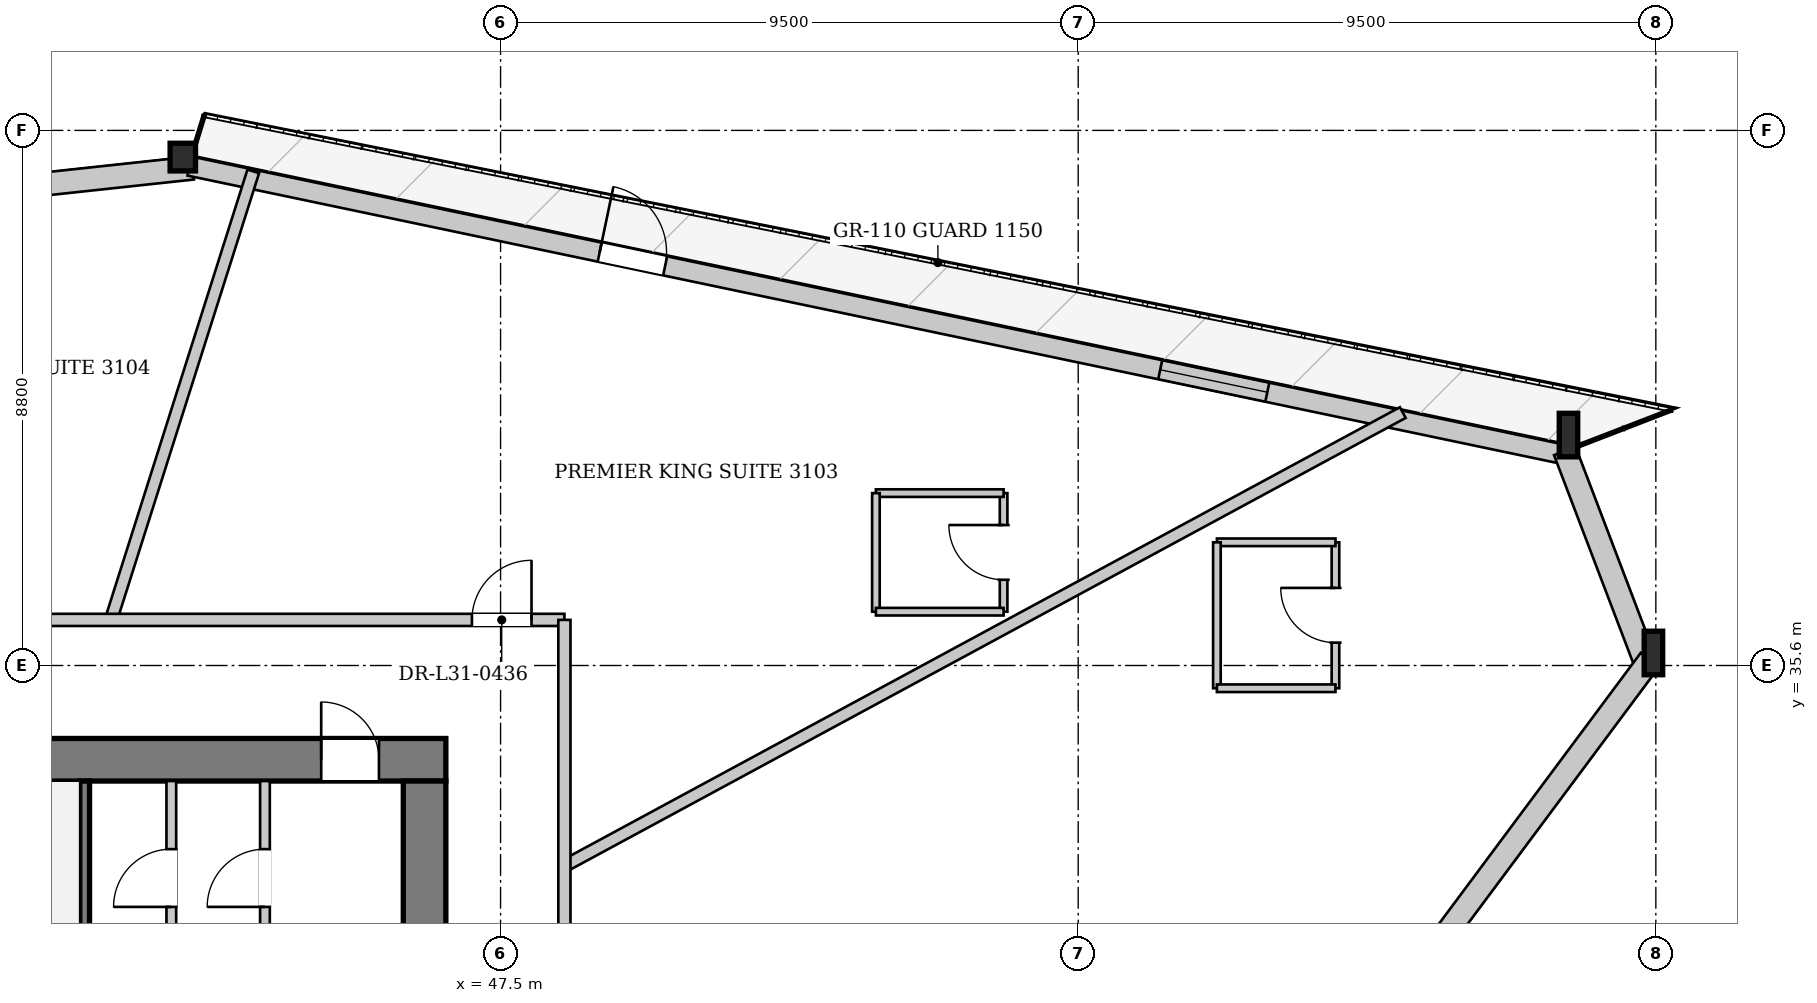
"""IFC4 building model, lengths in metres.
Left out: names, types, materials, properties, quantities, classifications, styles, units other than length and angle.
Written with IfcOpenShell. Run it as: python <this file> out.ifc"""

import sys

from ifc_helpers import new_model, si_unit, direction, frame, frame_2d, origin, origin_2d, place, context, subcontext, project, spatial, rectangle, i_section, extrude, source, transform, mapped, element, fill, save


model = new_model("IFC4")
c1 = context("Model", 3, precision=1e-05, world=origin(), true_north=direction((0.0, 1.0)))
c2 = subcontext(c1, "Body", "Model", "MODEL_VIEW")
j1 = project(units=[si_unit("LENGTHUNIT", "METRE"), si_unit("PLANEANGLEUNIT", "RADIAN")], contexts=[c1])
p1 = place(None, origin())
s1 = spatial("IfcSite", under=j1, at=p1, CompositionType="ELEMENT")
p2 = place(p1, origin())
s2 = spatial("IfcBuilding", under=s1, at=p2, CompositionType="ELEMENT")
p3 = place(p2, frame((0.0, 0.0, 119.9)))
s3 = spatial("IfcBuildingStorey", under=s2, at=p3, CompositionType="ELEMENT", Elevation=119.9)
m1 = source(origin(), c2, "Body", "SweptSolid", [
    extrude(i_section(OverallWidth=0.304, OverallDepth=0.716, WebThickness=0.021, FlangeThickness=0.04, at=origin_2d()), origin(), (0.0, 0.0, 1.0), 3.42),
])
p4 = place(p3, frame((66.557, 35.582, 0.0), z_axis=(-0.05632334247, 0.131135589503, 0.989763172814), x_axis=(-0.918834286781, -0.394643577719, 0.0)))
e1 = element("IfcColumn", 1, at=p4, inside=s3, PredefinedType="COLUMN", context=c2, shape_type="MappedRepresentation", body=[
    mapped(m1, transform((0.0, 0.0, 0.0), x_axis=(1.0, 0.0, 0.0), y_axis=(0.0, 1.0, 0.0), z_axis=(0.0, 0.0, 1.0), scale=1.0)),
])
m2 = source(origin(), c2, "Body", "SweptSolid", [
    extrude(i_section(OverallWidth=0.304, OverallDepth=0.716, WebThickness=0.021, FlangeThickness=0.04, at=origin_2d()), origin(), (0.0, 0.0, 1.0), 3.416),
])
p5 = place(p3, frame((65.181, 39.194, 0.0), z_axis=(-0.068833353091, 0.114436342989, 0.991043032822), x_axis=(-0.856925676529, -0.515439991566, 0.0)))
e2 = element("IfcColumn", 2, at=p5, inside=s3, PredefinedType="COLUMN", context=c2, shape_type="MappedRepresentation", body=[
    mapped(m2, transform((0.0, 0.0, 0.0), x_axis=(1.0, 0.0, 0.0), y_axis=(0.0, 1.0, 0.0), z_axis=(0.0, 0.0, 1.0), scale=1.0)),
])
m3 = source(origin(), c2, "Body", "SweptSolid", [
    extrude(i_section(OverallWidth=0.418, OverallDepth=0.455, WebThickness=0.038, FlangeThickness=0.059, at=origin_2d()), origin(), (0.0, 0.0, 1.0), 3.397),
])
p6 = place(p3, frame((42.417, 43.97, 0.0), z_axis=(-0.08401367615, -0.00546196697, 0.996449632012), x_axis=(0.064875871655, -0.997893341634, 0.0)))
e3 = element("IfcColumn", 3, at=p6, inside=s3, PredefinedType="COLUMN", context=c2, shape_type="MappedRepresentation", body=[
    mapped(m3, transform((0.0, 0.0, 0.0), x_axis=(1.0, 0.0, 0.0), y_axis=(0.0, 1.0, 0.0), z_axis=(0.0, 0.0, 1.0), scale=1.0)),
])
p7 = place(p3, frame((19.312, 41.287, 0.0), z_axis=(0.0, 0.0, 1.0), x_axis=(0.994233058372, 0.107240969969, 0.0)))
e4 = element("IfcWall", 4, at=p7, inside=s3, PredefinedType="SOLIDWALL", context=c2, shape_type="SweptSolid", body=[
    extrude(rectangle(XDim=23.26, YDim=0.38, at=frame_2d((11.63, 0.0))), origin(), (0.0, 0.0, 1.0), 2.692),
])
p8 = place(p7, frame((5.413, 0.0, 0.322)))
e5 = element("IfcOpeningElement", 5, at=p8, cuts=e4, PredefinedType="OPENING", context=c2, shape_type="SweptSolid", body=[
    extrude(rectangle(XDim=2.2, YDim=2.25, at=frame_2d((1.1, 1.125))), frame((0.0, 0.2, 0.0), z_axis=(0.0, -1.0, 0.0), x_axis=(1.0, 0.0, 0.0)), (0.0, 0.0, 1.0), 0.4),
])
p9 = place(p7, frame((15.647, 0.0, 0.322)))
e6 = element("IfcOpeningElement", 6, at=p9, cuts=e4, PredefinedType="OPENING", context=c2, shape_type="SweptSolid", body=[
    extrude(rectangle(XDim=2.2, YDim=2.25, at=frame_2d((1.1, 1.125))), frame((0.0, 0.2, 0.0), z_axis=(0.0, -1.0, 0.0), x_axis=(1.0, 0.0, 0.0)), (0.0, 0.0, 1.0), 0.4),
])
p10 = place(p3, frame((42.384, 43.813, 0.0), z_axis=(0.0, 0.0, 1.0), x_axis=(0.978690657653, -0.205340197291, 0.0)))
e7 = element("IfcWall", 7, at=p10, inside=s3, PredefinedType="SOLIDWALL", context=c2, shape_type="SweptSolid", body=[
    extrude(rectangle(XDim=23.26, YDim=0.32, at=frame_2d((11.63, 0.0))), origin(), (0.0, 0.0, 1.0), 2.692),
])
p11 = place(p10, frame((6.893, 0.0, 0.0)))
e8 = element("IfcOpeningElement", 8, at=p11, cuts=e7, PredefinedType="OPENING", context=c2, shape_type="SweptSolid", body=[
    extrude(rectangle(XDim=1.1, YDim=2.3, at=frame_2d((0.55, 1.15))), frame((0.0, 0.17, 0.0), z_axis=(0.0, -1.0, 0.0), x_axis=(1.0, 0.0, 0.0)), (0.0, 0.0, 1.0), 0.34),
])
p12 = place(p10, frame((16.312, 0.0, 0.372)))
e9 = element("IfcOpeningElement", 9, at=p12, cuts=e7, PredefinedType="OPENING", context=c2, shape_type="SweptSolid", body=[
    extrude(rectangle(XDim=1.8, YDim=2.2, at=frame_2d((0.9, 1.1))), frame((0.0, 0.17, 0.0), z_axis=(0.0, -1.0, 0.0), x_axis=(1.0, 0.0, 0.0)), (0.0, 0.0, 1.0), 0.34),
])
p13 = place(p3, frame((65.003, 39.126, 0.0), z_axis=(0.0, 0.0, 1.0), x_axis=(0.355929661072, -0.934512748104, 0.0)))
e10 = element("IfcWall", 10, at=p13, inside=s3, PredefinedType="SOLIDWALL", context=c2, shape_type="SweptSolid", body=[
    extrude(rectangle(XDim=3.865, YDim=0.38, at=frame_2d((1.933, 0.0))), origin(), (0.0, 0.0, 1.0), 2.692),
])
p14 = place(p3, frame((66.404, 35.695, 0.0), z_axis=(0.0, 0.0, 1.0), x_axis=(-0.59725858194, -0.802048743094, 0.0)))
e11 = element("IfcWall", 11, at=p14, inside=s3, PredefinedType="SOLIDWALL", context=c2, shape_type="SweptSolid", body=[
    extrude(rectangle(XDim=23.855, YDim=0.38, at=frame_2d((11.927, 0.0))), origin(), (0.0, 0.0, 1.0), 2.692),
])
p15 = place(p14, frame((5.579, 0.0, 0.322)))
e12 = element("IfcOpeningElement", 12, at=p15, cuts=e11, PredefinedType="OPENING", context=c2, shape_type="SweptSolid", body=[
    extrude(rectangle(XDim=2.2, YDim=2.25, at=frame_2d((1.1, 1.125))), frame((0.0, 0.2, 0.0), z_axis=(0.0, -1.0, 0.0), x_axis=(1.0, 0.0, 0.0)), (0.0, 0.0, 1.0), 0.4),
])
p16 = place(p14, frame((14.476, 0.0, 0.322)))
e13 = element("IfcOpeningElement", 13, at=p16, cuts=e11, PredefinedType="OPENING", context=c2, shape_type="SweptSolid", body=[
    extrude(rectangle(XDim=2.2, YDim=2.25, at=frame_2d((1.1, 1.125))), frame((0.0, 0.2, 0.0), z_axis=(0.0, -1.0, 0.0), x_axis=(1.0, 0.0, 0.0)), (0.0, 0.0, 1.0), 0.4),
])
p17 = place(p3, frame((29.4, 34.05, 0.0), z_axis=(0.0, 0.0, 1.0), x_axis=(1.0, 0.0, 0.0)))
e14 = element("IfcWall", 14, at=p17, inside=s3, PredefinedType="SHEAR", context=c2, shape_type="SweptSolid", body=[
    extrude(rectangle(XDim=17.2, YDim=0.7, at=frame_2d((8.6, 0.0))), origin(), (0.0, 0.0, 1.0), 3.3),
])
p18 = place(p17, frame((1.7, 0.0, 0.0)))
e15 = element("IfcOpeningElement", 15, at=p18, cuts=e14, PredefinedType="OPENING", context=c2, shape_type="SweptSolid", body=[
    extrude(rectangle(XDim=0.95, YDim=2.1, at=frame_2d((0.475, 1.05))), frame((0.0, 0.36, 0.0), z_axis=(0.0, -1.0, 0.0), x_axis=(1.0, 0.0, 0.0)), (0.0, 0.0, 1.0), 0.72),
])
p19 = place(p17, frame((4.08, 0.0, 0.0)))
e16 = element("IfcOpeningElement", 16, at=p19, cuts=e14, PredefinedType="OPENING", context=c2, shape_type="SweptSolid", body=[
    extrude(rectangle(XDim=1.32, YDim=2.2, at=frame_2d((0.66, 1.1))), frame((0.0, 0.36, 0.0), z_axis=(0.0, -1.0, 0.0), x_axis=(1.0, 0.0, 0.0)), (0.0, 0.0, 1.0), 0.72),
])
p20 = place(p17, frame((15.15, 0.0, 0.0)))
e17 = element("IfcOpeningElement", 17, at=p20, cuts=e14, PredefinedType="OPENING", context=c2, shape_type="SweptSolid", body=[
    extrude(rectangle(XDim=0.95, YDim=2.1, at=frame_2d((0.475, 1.05))), frame((0.0, 0.36, 0.0), z_axis=(0.0, -1.0, 0.0), x_axis=(1.0, 0.0, 0.0)), (0.0, 0.0, 1.0), 0.72),
])
p21 = place(p3, frame((46.25, 33.7, 0.0), z_axis=(0.0, 0.0, 1.0), x_axis=(0.0, -1.0, 0.0)))
e18 = element("IfcWall", 18, at=p21, inside=s3, PredefinedType="SHEAR", context=c2, shape_type="SweptSolid", body=[
    extrude(rectangle(XDim=14.2, YDim=0.7, at=frame_2d((7.1, 0.0))), origin(), (0.0, 0.0, 1.0), 3.3),
])
p22 = place(p21, frame((5.18, 0.0, 0.0)))
e19 = element("IfcOpeningElement", 19, at=p22, cuts=e18, PredefinedType="OPENING", context=c2, shape_type="SweptSolid", body=[
    extrude(rectangle(XDim=1.6, YDim=2.2, at=frame_2d((0.8, 1.1))), frame((0.0, 0.36, 0.0), z_axis=(0.0, -1.0, 0.0), x_axis=(1.0, 0.0, 0.0)), (0.0, 0.0, 1.0), 0.72),
])
p23 = place(p3, frame((40.66, 30.6, 0.0), z_axis=(0.0, 0.0, 1.0), x_axis=(0.0, 1.0, 0.0)))
e20 = element("IfcWall", 20, at=p23, inside=s3, PredefinedType="PARTITIONING", context=c2, shape_type="SweptSolid", body=[
    extrude(rectangle(XDim=3.1, YDim=0.16, at=frame_2d((1.55, 0.0))), origin(), (0.0, 0.0, 1.0), 3.3),
])
p24 = place(p3, frame((42.085, 30.68, 0.0), z_axis=(0.0, 0.0, 1.0), x_axis=(0.0, 1.0, 0.0)))
e21 = element("IfcWall", 21, at=p24, inside=s3, PredefinedType="PARTITIONING", context=c2, shape_type="SweptSolid", body=[
    extrude(rectangle(XDim=3.02, YDim=0.16, at=frame_2d((1.51, 0.0))), origin(), (0.0, 0.0, 1.0), 3.3),
])
p25 = place(p24, frame((0.95, 0.0, 0.0)))
e22 = element("IfcOpeningElement", 22, at=p25, cuts=e21, PredefinedType="OPENING", context=c2, shape_type="SweptSolid", body=[
    extrude(rectangle(XDim=0.95, YDim=2.1, at=frame_2d((0.475, 1.05))), frame((0.0, 0.09, 0.0), z_axis=(0.0, -1.0, 0.0), x_axis=(1.0, 0.0, 0.0)), (0.0, 0.0, 1.0), 0.18),
])
p26 = place(p3, frame((43.625, 30.68, 0.0), z_axis=(0.0, 0.0, 1.0), x_axis=(0.0, 1.0, 0.0)))
e23 = element("IfcWall", 23, at=p26, inside=s3, PredefinedType="PARTITIONING", context=c2, shape_type="SweptSolid", body=[
    extrude(rectangle(XDim=3.02, YDim=0.16, at=frame_2d((1.51, 0.0))), origin(), (0.0, 0.0, 1.0), 3.3),
])
p27 = place(p26, frame((0.95, 0.0, 0.0)))
e24 = element("IfcOpeningElement", 24, at=p27, cuts=e23, PredefinedType="OPENING", context=c2, shape_type="SweptSolid", body=[
    extrude(rectangle(XDim=0.95, YDim=2.1, at=frame_2d((0.475, 1.05))), frame((0.0, 0.09, 0.0), z_axis=(0.0, -1.0, 0.0), x_axis=(1.0, 0.0, 0.0)), (0.0, 0.0, 1.0), 0.18),
])
p28 = place(p3, frame((48.55, 32.304, 0.0), z_axis=(0.0, 0.0, 1.0), x_axis=(0.879655089174, 0.475612157215, 0.0)))
e25 = element("IfcWall", 25, at=p28, inside=s3, PredefinedType="PARTITIONING", context=c2, shape_type="SweptSolid", body=[
    extrude(rectangle(XDim=15.675, YDim=0.2, at=frame_2d((7.837, 0.0))), origin(), (0.0, 0.0, 1.0), 3.3),
])
p29 = place(p3, frame((41.093, 36.35, 0.0), z_axis=(0.0, 0.0, 1.0), x_axis=(0.302366217447, 0.953191833026, 0.0)))
e26 = element("IfcWall", 26, at=p29, inside=s3, PredefinedType="PARTITIONING", context=c2, shape_type="SweptSolid", body=[
    extrude(rectangle(XDim=7.739, YDim=0.2, at=frame_2d((3.869, 0.0))), origin(), (0.0, 0.0, 1.0), 3.3),
])
p30 = place(p3, frame((61.231, 35.226, 0.0), z_axis=(0.0, 0.0, 1.0), x_axis=(0.0, 1.0, 0.0)))
e27 = element("IfcWall", 27, at=p30, inside=s3, PredefinedType="PARTITIONING", context=c2, shape_type="SweptSolid", body=[
    extrude(rectangle(XDim=2.4, YDim=0.125, at=frame_2d((1.2, 0.0))), origin(), (0.0, 0.0, 1.0), 3.3),
])
p31 = place(p30, frame((0.75, 0.0, 0.0)))
e28 = element("IfcOpeningElement", 28, at=p31, cuts=e27, PredefinedType="OPENING", context=c2, shape_type="SweptSolid", body=[
    extrude(rectangle(XDim=0.9, YDim=2.1, at=frame_2d((0.45, 1.05))), frame((0.0, 0.073, 0.0), z_axis=(0.0, -1.0, 0.0), x_axis=(1.0, 0.0, 0.0)), (0.0, 0.0, 1.0), 0.145),
])
p32 = place(p3, frame((61.231, 37.626, 0.0), z_axis=(0.0, 0.0, 1.0), x_axis=(-1.0, 0.0, 0.0)))
e29 = element("IfcWall", 29, at=p32, inside=s3, PredefinedType="PARTITIONING", context=c2, shape_type="SweptSolid", body=[
    extrude(rectangle(XDim=1.95, YDim=0.125, at=frame_2d((0.975, 0.0))), origin(), (0.0, 0.0, 1.0), 2.795),
])
p33 = place(p3, frame((59.281, 37.626, 0.0), z_axis=(0.0, 0.0, 1.0), x_axis=(0.0, -1.0, 0.0)))
e30 = element("IfcWall", 30, at=p33, inside=s3, PredefinedType="PARTITIONING", context=c2, shape_type="SweptSolid", body=[
    extrude(rectangle(XDim=2.4, YDim=0.125, at=frame_2d((1.2, 0.0))), origin(), (0.0, 0.0, 1.0), 3.3),
])
p34 = place(p3, frame((59.281, 35.226, 0.0), z_axis=(0.0, 0.0, 1.0), x_axis=(1.0, 0.0, 0.0)))
e31 = element("IfcWall", 31, at=p34, inside=s3, PredefinedType="PARTITIONING", context=c2, shape_type="SweptSolid", body=[
    extrude(rectangle(XDim=1.95, YDim=0.125, at=frame_2d((0.975, 0.0))), origin(), (0.0, 0.0, 1.0), 3.3),
])
p35 = place(p3, frame((55.773, 36.485, 0.0), z_axis=(0.0, 0.0, 1.0), x_axis=(0.0, 1.0, 0.0)))
e32 = element("IfcWall", 32, at=p35, inside=s3, PredefinedType="PARTITIONING", context=c2, shape_type="SweptSolid", body=[
    extrude(rectangle(XDim=1.95, YDim=0.125, at=frame_2d((0.975, 0.0))), origin(), (0.0, 0.0, 1.0), 3.3),
])
p36 = place(p35, frame((0.525, 0.0, 0.0)))
e33 = element("IfcOpeningElement", 33, at=p36, cuts=e32, PredefinedType="OPENING", context=c2, shape_type="SweptSolid", body=[
    extrude(rectangle(XDim=0.9, YDim=2.1, at=frame_2d((0.45, 1.05))), frame((0.0, 0.073, 0.0), z_axis=(0.0, -1.0, 0.0), x_axis=(1.0, 0.0, 0.0)), (0.0, 0.0, 1.0), 0.145),
])
p37 = place(p3, frame((55.773, 38.435, 0.0), z_axis=(0.0, 0.0, 1.0), x_axis=(-1.0, 0.0, 0.0)))
e34 = element("IfcWall", 34, at=p37, inside=s3, PredefinedType="PARTITIONING", context=c2, shape_type="SweptSolid", body=[
    extrude(rectangle(XDim=2.1, YDim=0.125, at=frame_2d((1.05, 0.0))), origin(), (0.0, 0.0, 1.0), 3.3),
])
p38 = place(p3, frame((53.673, 38.435, 0.0), z_axis=(0.0, 0.0, 1.0), x_axis=(0.0, -1.0, 0.0)))
e35 = element("IfcWall", 35, at=p38, inside=s3, PredefinedType="PARTITIONING", context=c2, shape_type="SweptSolid", body=[
    extrude(rectangle(XDim=1.95, YDim=0.125, at=frame_2d((0.975, 0.0))), origin(), (0.0, 0.0, 1.0), 3.3),
])
p39 = place(p3, frame((53.673, 36.485, 0.0), z_axis=(0.0, 0.0, 1.0), x_axis=(1.0, 0.0, 0.0)))
e36 = element("IfcWall", 36, at=p39, inside=s3, PredefinedType="PARTITIONING", context=c2, shape_type="SweptSolid", body=[
    extrude(rectangle(XDim=2.1, YDim=0.125, at=frame_2d((1.05, 0.0))), origin(), (0.0, 0.0, 1.0), 2.985),
])
p40 = place(p3, frame((27.45, 36.35, 0.0), z_axis=(0.0, 0.0, 1.0), x_axis=(1.0, 0.0, 0.0)))
e37 = element("IfcWall", 37, at=p40, inside=s3, PredefinedType="PARTITIONING", context=c2, shape_type="SweptSolid", body=[
    extrude(rectangle(XDim=21.1, YDim=0.2, at=frame_2d((10.55, 0.0))), origin(), (0.0, 0.0, 1.0), 3.3),
])
p41 = place(p40, frame((19.579, 0.0, 0.0)))
e38 = element("IfcOpeningElement", 38, at=p41, cuts=e37, PredefinedType="OPENING", context=c2, shape_type="SweptSolid", body=[
    extrude(rectangle(XDim=0.98, YDim=2.15, at=frame_2d((0.49, 1.075))), frame((0.0, 0.11, 0.0), z_axis=(0.0, -1.0, 0.0), x_axis=(1.0, 0.0, 0.0)), (0.0, 0.0, 1.0), 0.22),
])
p42 = place(p40, frame((10.375, 0.0, 0.0)))
e39 = element("IfcOpeningElement", 39, at=p42, cuts=e37, PredefinedType="OPENING", context=c2, shape_type="SweptSolid", body=[
    extrude(rectangle(XDim=0.98, YDim=2.15, at=frame_2d((0.49, 1.075))), frame((0.0, 0.11, 0.0), z_axis=(0.0, -1.0, 0.0), x_axis=(1.0, 0.0, 0.0)), (0.0, 0.0, 1.0), 0.22),
])
p43 = place(p3, frame((48.55, 16.85, 0.0), z_axis=(0.0, 0.0, 1.0), x_axis=(0.0, 1.0, 0.0)))
e40 = element("IfcWall", 40, at=p43, inside=s3, PredefinedType="PARTITIONING", context=c2, shape_type="SweptSolid", body=[
    extrude(rectangle(XDim=19.5, YDim=0.2, at=frame_2d((9.75, 0.0))), origin(), (0.0, 0.0, 1.0), 3.3),
])
p44 = place(p43, frame((10.652, 0.0, 0.0)))
e41 = element("IfcOpeningElement", 41, at=p44, cuts=e40, PredefinedType="OPENING", context=c2, shape_type="SweptSolid", body=[
    extrude(rectangle(XDim=0.98, YDim=2.15, at=frame_2d((0.49, 1.075))), frame((0.0, 0.11, 0.0), z_axis=(0.0, -1.0, 0.0), x_axis=(1.0, 0.0, 0.0)), (0.0, 0.0, 1.0), 0.22),
])
m4 = source(origin(), c2, "Body", "SweptSolid", [
    extrude(rectangle(XDim=1.1, YDim=2.3, at=frame_2d((0.55, 1.15))), frame((0.0, 0.025, 0.0), z_axis=(0.0, -1.0, 0.0), x_axis=(1.0, 0.0, 0.0)), (0.0, 0.0, 1.0), 0.05),
])
p45 = place(p11, origin())
e42 = element("IfcDoor", 42, at=p45, inside=s3, OperationType="SINGLE_SWING_LEFT", PredefinedType="DOOR", context=c2, shape_type="MappedRepresentation", body=[
    mapped(m4, transform((0.0, 0.0, 0.0), x_axis=(1.0, 0.0, 0.0), y_axis=(0.0, 1.0, 0.0), z_axis=(0.0, 0.0, 1.0), scale=1.0)),
])
fill(e8, e42)
m5 = source(origin(), c2, "Body", "SweptSolid", [
    extrude(rectangle(XDim=1.8, YDim=2.2, at=frame_2d((0.9, 1.1))), frame((0.0, 0.03, 0.0), z_axis=(0.0, -1.0, 0.0), x_axis=(1.0, 0.0, 0.0)), (0.0, 0.0, 1.0), 0.06),
])
p46 = place(p12, origin())
e43 = element("IfcWindow", 43, at=p46, inside=s3, PartitioningType="SINGLE_PANEL", PredefinedType="WINDOW", context=c2, shape_type="MappedRepresentation", body=[
    mapped(m5, transform((0.0, 0.0, 0.0), x_axis=(1.0, 0.0, 0.0), y_axis=(0.0, 1.0, 0.0), z_axis=(0.0, 0.0, 1.0), scale=1.0)),
])
fill(e9, e43)
m6 = source(origin(), c2, "Body", "SweptSolid", [
    extrude(rectangle(XDim=0.95, YDim=2.1, at=frame_2d((0.475, 1.05))), frame((0.0, 0.025, 0.0), z_axis=(0.0, -1.0, 0.0), x_axis=(1.0, 0.0, 0.0)), (0.0, 0.0, 1.0), 0.05),
])
p47 = place(p25, origin())
e44 = element("IfcDoor", 44, at=p47, inside=s3, OperationType="SINGLE_SWING_LEFT", PredefinedType="DOOR", context=c2, shape_type="MappedRepresentation", body=[
    mapped(m6, transform((0.0, 0.0, 0.0), x_axis=(1.0, 0.0, 0.0), y_axis=(0.0, 1.0, 0.0), z_axis=(0.0, 0.0, 1.0), scale=1.0)),
])
fill(e22, e44)
p48 = place(p27, origin())
e45 = element("IfcDoor", 45, at=p48, inside=s3, OperationType="SINGLE_SWING_LEFT", PredefinedType="DOOR", context=c2, shape_type="MappedRepresentation", body=[
    mapped(m6, transform((0.0, 0.0, 0.0), x_axis=(1.0, 0.0, 0.0), y_axis=(0.0, 1.0, 0.0), z_axis=(0.0, 0.0, 1.0), scale=1.0)),
])
fill(e24, e45)
p49 = place(p20, origin())
e46 = element("IfcDoor", 46, at=p49, inside=s3, OperationType="SINGLE_SWING_LEFT", PredefinedType="DOOR", context=c2, shape_type="MappedRepresentation", body=[
    mapped(m6, transform((0.0, 0.0, 0.0), x_axis=(1.0, 0.0, 0.0), y_axis=(0.0, 1.0, 0.0), z_axis=(0.0, 0.0, 1.0), scale=1.0)),
])
fill(e17, e46)
m7 = source(origin(), c2, "Body", "SweptSolid", [
    extrude(rectangle(XDim=0.9, YDim=2.1, at=frame_2d((0.45, 1.05))), frame((0.0, 0.025, 0.0), z_axis=(0.0, -1.0, 0.0), x_axis=(1.0, 0.0, 0.0)), (0.0, 0.0, 1.0), 0.05),
])
p50 = place(p31, origin())
e47 = element("IfcDoor", 47, at=p50, inside=s3, OperationType="SINGLE_SWING_RIGHT", PredefinedType="DOOR", context=c2, shape_type="MappedRepresentation", body=[
    mapped(m7, transform((0.0, 0.0, 0.0), x_axis=(1.0, 0.0, 0.0), y_axis=(0.0, 1.0, 0.0), z_axis=(0.0, 0.0, 1.0), scale=1.0)),
])
fill(e28, e47)
p51 = place(p36, origin())
e48 = element("IfcDoor", 48, at=p51, inside=s3, OperationType="SINGLE_SWING_RIGHT", PredefinedType="DOOR", context=c2, shape_type="MappedRepresentation", body=[
    mapped(m7, transform((0.0, 0.0, 0.0), x_axis=(1.0, 0.0, 0.0), y_axis=(0.0, 1.0, 0.0), z_axis=(0.0, 0.0, 1.0), scale=1.0)),
])
fill(e33, e48)
m8 = source(origin(), c2, "Body", "SweptSolid", [
    extrude(rectangle(XDim=0.98, YDim=2.15, at=frame_2d((0.49, 1.075))), frame((0.0, 0.025, 0.0), z_axis=(0.0, -1.0, 0.0), x_axis=(1.0, 0.0, 0.0)), (0.0, 0.0, 1.0), 0.05),
])
p52 = place(p41, origin())
e49 = element("IfcDoor", 49, at=p52, inside=s3, OperationType="SINGLE_SWING_RIGHT", PredefinedType="DOOR", context=c2, shape_type="MappedRepresentation", body=[
    mapped(m8, transform((0.0, 0.0, 0.0), x_axis=(1.0, 0.0, 0.0), y_axis=(0.0, 1.0, 0.0), z_axis=(0.0, 0.0, 1.0), scale=1.0)),
])
fill(e38, e49)
save(model, sys.argv[1])
